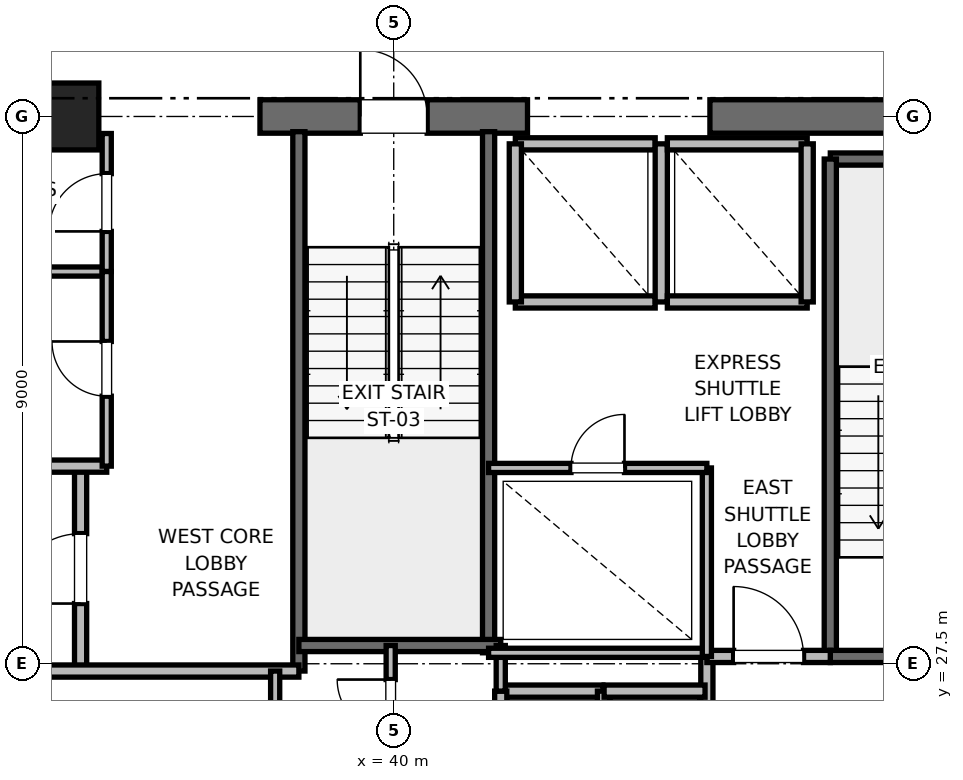
"""IFC4 building model, lengths in metres.
Left out: names, types, materials, properties, quantities, classifications, styles, units other than length and angle.
Written with IfcOpenShell. Run it as: python <this file> out.ifc"""

import sys

from ifc_helpers import new_model, si_unit, direction, frame, frame_2d, origin, origin_2d, place, context, subcontext, project, spatial, rectangle, extrude, element, fill, save


model = new_model("IFC4")
c1 = context("Model", 3, precision=1e-05, world=origin(), true_north=direction((0.0, 1.0)))
c2 = subcontext(c1, "Body", "Model", "MODEL_VIEW")
j1 = project(units=[si_unit("LENGTHUNIT", "METRE"), si_unit("PLANEANGLEUNIT", "RADIAN")], contexts=[c1])
p1 = place(None, origin())
s1 = spatial("IfcSite", under=j1, at=p1, CompositionType="ELEMENT")
p2 = place(p1, origin())
s2 = spatial("IfcBuilding", under=s1, at=p2, CompositionType="ELEMENT")
p3 = place(p2, frame((0.0, 0.0, 164.4)))
s3 = spatial("IfcBuildingStorey", under=s2, at=p3, CompositionType="ELEMENT", Elevation=164.4)
p4 = place(p3, frame((34.6, 36.5, 0.0), z_axis=(0.0, 0.0, 1.0), x_axis=(1.0, 0.0, 0.0)))
e1 = element("IfcColumn", 1, at=p4, inside=s3, PredefinedType="PILASTER", context=c2, shape_type="SweptSolid", body=[
    extrude(rectangle(XDim=1.1, YDim=1.1, at=origin_2d()), origin(), (0.0, 0.0, 1.0), 4.0),
])
p5 = place(p3, frame((29.0, 36.5, 0.0), z_axis=(0.0, 0.0, 1.0), x_axis=(1.0, 0.0, 0.0)))
e2 = element("IfcWall", 2, at=p5, inside=s3, PredefinedType="SHEAR", context=c2, shape_type="SweptSolid", body=[
    extrude(rectangle(XDim=5.8, YDim=0.55, at=frame_2d((2.9, 0.0))), origin(), (0.0, 0.0, 1.0), 3.775),
])
p6 = place(p3, frame((37.8, 36.5, 0.0), z_axis=(0.0, 0.0, 1.0), x_axis=(1.0, 0.0, 0.0)))
e3 = element("IfcWall", 3, at=p6, inside=s3, PredefinedType="SHEAR", context=c2, shape_type="SweptSolid", body=[
    extrude(rectangle(XDim=4.4, YDim=0.55, at=frame_2d((2.2, 0.0))), origin(), (0.0, 0.0, 1.0), 3.775),
])
p7 = place(p6, frame((1.65, 0.0, 0.0)))
e4 = element("IfcOpeningElement", 4, at=p7, cuts=e3, PredefinedType="OPENING", context=c2, shape_type="SweptSolid", body=[
    extrude(rectangle(XDim=1.1, YDim=2.15, at=frame_2d((0.55, 1.075))), frame((0.0, 0.275, 0.0), z_axis=(0.0, -1.0, 0.0), x_axis=(1.0, 0.0, 0.0)), (0.0, 0.0, 1.0), 0.55),
])
p8 = place(p3, frame((45.2, 36.5, 0.0), z_axis=(0.0, 0.0, 1.0), x_axis=(1.0, 0.0, 0.0)))
e5 = element("IfcWall", 5, at=p8, inside=s3, PredefinedType="SHEAR", context=c2, shape_type="SweptSolid", body=[
    extrude(rectangle(XDim=5.8, YDim=0.55, at=frame_2d((2.9, 0.0))), origin(), (0.0, 0.0, 1.0), 3.775),
])
p9 = place(p3, frame((47.18, 35.8, 0.0), z_axis=(0.0, 0.0, 1.0), x_axis=(1.0, 0.0, 0.0)))
e6 = element("IfcWall", 6, at=p9, inside=s3, PredefinedType="SOLIDWALL", context=c2, shape_type="SweptSolid", body=[
    extrude(rectangle(XDim=3.12, YDim=0.2, at=frame_2d((1.56, 0.0))), origin(), (0.0, 0.0, 1.0), 3.775),
])
p10 = place(p3, frame((47.18, 27.62, 0.0), z_axis=(0.0, 0.0, 1.0), x_axis=(0.0, 1.0, 0.0)))
e7 = element("IfcWall", 7, at=p10, inside=s3, PredefinedType="SOLIDWALL", context=c2, shape_type="SweptSolid", body=[
    extrude(rectangle(XDim=8.18, YDim=0.2, at=frame_2d((4.09, 0.0))), origin(), (0.0, 0.0, 1.0), 3.775),
])
p11 = place(p3, frame((47.18, 27.62, 0.0), z_axis=(0.0, 0.0, 1.0), x_axis=(1.0, 0.0, 0.0)))
e8 = element("IfcWall", 8, at=p11, inside=s3, PredefinedType="SOLIDWALL", context=c2, shape_type="SweptSolid", body=[
    extrude(rectangle(XDim=3.12, YDim=0.2, at=frame_2d((1.56, 0.0))), origin(), (0.0, 0.0, 1.0), 3.775),
])
p12 = place(p11, frame((1.01, 0.0, 0.0)))
e9 = element("IfcOpeningElement", 9, at=p12, cuts=e8, PredefinedType="OPENING", context=c2, shape_type="SweptSolid", body=[
    extrude(rectangle(XDim=1.1, YDim=2.15, at=frame_2d((0.55, 1.075))), frame((0.0, 0.1, 0.0), z_axis=(0.0, -1.0, 0.0), x_axis=(1.0, 0.0, 0.0)), (0.0, 0.0, 1.0), 0.2),
])
p13 = place(p3, frame((38.44, 27.38, 0.0), z_axis=(0.0, 0.0, 1.0), x_axis=(0.0, 1.0, 0.0)))
e10 = element("IfcWall", 10, at=p13, inside=s3, PredefinedType="SOLIDWALL", context=c2, shape_type="SweptSolid", body=[
    extrude(rectangle(XDim=8.87, YDim=0.2, at=frame_2d((4.435, 0.0))), origin(), (0.0, 0.0, 1.0), 3.775),
])
p14 = place(p3, frame((41.56, 27.68, 0.0), z_axis=(0.0, 0.0, 1.0), x_axis=(0.0, 1.0, 0.0)))
e11 = element("IfcWall", 11, at=p14, inside=s3, PredefinedType="SOLIDWALL", context=c2, shape_type="SweptSolid", body=[
    extrude(rectangle(XDim=8.57, YDim=0.2, at=frame_2d((4.285, 0.0))), origin(), (0.0, 0.0, 1.0), 3.775),
])
p15 = place(p3, frame((38.44, 27.8, 0.0), z_axis=(0.0, 0.0, 1.0), x_axis=(1.0, 0.0, 0.0)))
e12 = element("IfcWall", 12, at=p15, inside=s3, PredefinedType="SOLIDWALL", context=c2, shape_type="SweptSolid", body=[
    extrude(rectangle(XDim=3.32, YDim=0.2, at=frame_2d((1.66, 0.0))), origin(), (0.0, 0.0, 1.0), 3.775),
])
p16 = place(p3, frame((34.85, 27.38, 0.0), z_axis=(0.0, 0.0, 1.0), x_axis=(0.0, 1.0, 0.0)))
e13 = element("IfcWall", 13, at=p16, inside=s3, PredefinedType="PARTITIONING", context=c2, shape_type="SweptSolid", body=[
    extrude(rectangle(XDim=3.37, YDim=0.2, at=frame_2d((1.685, 0.0))), origin(), (0.0, 0.0, 1.0), 3.775),
])
p17 = place(p16, frame((1.11, 0.0, 0.0)))
e14 = element("IfcOpeningElement", 14, at=p17, cuts=e13, PredefinedType="OPENING", context=c2, shape_type="SweptSolid", body=[
    extrude(rectangle(XDim=1.15, YDim=2.2, at=frame_2d((0.575, 1.1))), frame((0.0, 0.1, 0.0), z_axis=(0.0, -1.0, 0.0), x_axis=(1.0, 0.0, 0.0)), (0.0, 0.0, 1.0), 0.2),
])
p18 = place(p3, frame((32.82, 27.38, 0.0), z_axis=(0.0, 0.0, 1.0), x_axis=(1.0, 0.0, 0.0)))
e15 = element("IfcWall", 15, at=p18, inside=s3, PredefinedType="PARTITIONING", context=c2, shape_type="SweptSolid", body=[
    extrude(rectangle(XDim=5.62, YDim=0.2, at=frame_2d((2.81, 0.0))), origin(), (0.0, 0.0, 1.0), 3.775),
])
p19 = place(p3, frame((32.15, 30.75, 0.0), z_axis=(0.0, 0.0, 1.0), x_axis=(1.0, 0.0, 0.0)))
e16 = element("IfcWall", 16, at=p19, inside=s3, PredefinedType="PARTITIONING", context=c2, shape_type="SweptSolid", body=[
    extrude(rectangle(XDim=3.13, YDim=0.2, at=frame_2d((1.565, 0.0))), origin(), (0.0, 0.0, 1.0), 3.775),
])
p20 = place(p3, frame((45.15, 24.25, 0.0), z_axis=(0.0, 0.0, 1.0), x_axis=(0.0, 1.0, 0.0)))
e17 = element("IfcWall", 17, at=p20, inside=s3, PredefinedType="PARTITIONING", context=c2, shape_type="SweptSolid", body=[
    extrude(rectangle(XDim=3.37, YDim=0.2, at=frame_2d((1.685, 0.0))), origin(), (0.0, 0.0, 1.0), 3.775),
])
p21 = place(p3, frame((45.15, 27.62, 0.0), z_axis=(0.0, 0.0, 1.0), x_axis=(1.0, 0.0, 0.0)))
e18 = element("IfcWall", 18, at=p21, inside=s3, PredefinedType="PARTITIONING", context=c2, shape_type="SweptSolid", body=[
    extrude(rectangle(XDim=2.03, YDim=0.2, at=frame_2d((1.015, 0.0))), origin(), (0.0, 0.0, 1.0), 3.775),
])
p22 = place(p21, frame((0.44, 0.0, 0.0)))
e19 = element("IfcOpeningElement", 19, at=p22, cuts=e18, PredefinedType="OPENING", context=c2, shape_type="SweptSolid", body=[
    extrude(rectangle(XDim=1.15, YDim=2.2, at=frame_2d((0.575, 1.1))), frame((0.0, 0.1, 0.0), z_axis=(0.0, -1.0, 0.0), x_axis=(1.0, 0.0, 0.0)), (0.0, 0.0, 1.0), 0.2),
])
p23 = place(p3, frame((43.44, 27.05, 0.0), z_axis=(0.0, 0.0, 1.0), x_axis=(-1.0, 0.0, 0.0)))
e20 = element("IfcWall", 20, at=p23, inside=s3, PredefinedType="SOLIDWALL", context=c2, shape_type="SweptSolid", body=[
    extrude(rectangle(XDim=1.68, YDim=0.2, at=frame_2d((0.84, 0.0))), origin(), (0.0, 0.0, 1.0), 3.775),
])
for number, where, z_axis, x_axis in (
    (21, (41.76, 27.05, 0.0), (0.0, 0.0, 1.0), (0.0, -1.0, 0.0)),
    (22, (43.45, 24.45, 0.0), (0.0, 0.0, 1.0), (0.0, 1.0, 0.0)),
):
    element("IfcWall", number, at=place(p3, frame(where, z_axis=z_axis, x_axis=x_axis)), inside=s3, PredefinedType="SOLIDWALL", context=c2, shape_type="SweptSolid", body=[
        extrude(rectangle(XDim=2.6, YDim=0.2, at=frame_2d((1.3, 0.0))), origin(), (0.0, 0.0, 1.0), 3.775),
    ])
p24 = place(p3, frame((45.12, 27.05, 0.0), z_axis=(0.0, 0.0, 1.0), x_axis=(-1.0, 0.0, 0.0)))
e23 = element("IfcWall", 23, at=p24, inside=s3, PredefinedType="SOLIDWALL", context=c2, shape_type="SweptSolid", body=[
    extrude(rectangle(XDim=1.66, YDim=0.2, at=frame_2d((0.83, 0.0))), origin(), (0.0, 0.0, 1.0), 3.775),
])
p25 = place(p3, frame((42.0, 33.45, 0.0), z_axis=(0.0, 0.0, 1.0), x_axis=(1.0, 0.0, 0.0)))
e24 = element("IfcWall", 24, at=p25, inside=s3, PredefinedType="SOLIDWALL", context=c2, shape_type="SweptSolid", body=[
    extrude(rectangle(XDim=2.3, YDim=0.2, at=frame_2d((1.15, 0.0))), origin(), (0.0, 0.0, 1.0), 3.775),
])
p26 = place(p3, frame((44.3, 36.05, 0.0), z_axis=(0.0, 0.0, 1.0), x_axis=(-1.0, 0.0, 0.0)))
e25 = element("IfcWall", 25, at=p26, inside=s3, PredefinedType="SOLIDWALL", context=c2, shape_type="SweptSolid", body=[
    extrude(rectangle(XDim=2.3, YDim=0.2, at=frame_2d((1.15, 0.0))), origin(), (0.0, 0.0, 1.0), 2.755),
])
for number, where, z_axis, x_axis in (
    (26, (42.0, 36.05, 0.0), (0.0, 0.0, 1.0), (0.0, -1.0, 0.0)),
    (27, (44.4, 33.45, 0.0), (0.0, 0.0, 1.0), (0.0, 1.0, 0.0)),
):
    element("IfcWall", number, at=place(p3, frame(where, z_axis=z_axis, x_axis=x_axis)), inside=s3, PredefinedType="SOLIDWALL", context=c2, shape_type="SweptSolid", body=[
        extrude(rectangle(XDim=2.6, YDim=0.2, at=frame_2d((1.3, 0.0))), origin(), (0.0, 0.0, 1.0), 2.755),
    ])
p27 = place(p3, frame((44.5, 33.45, 0.0), z_axis=(0.0, 0.0, 1.0), x_axis=(1.0, 0.0, 0.0)))
e28 = element("IfcWall", 28, at=p27, inside=s3, PredefinedType="SOLIDWALL", context=c2, shape_type="SweptSolid", body=[
    extrude(rectangle(XDim=2.3, YDim=0.2, at=frame_2d((1.15, 0.0))), origin(), (0.0, 0.0, 1.0), 3.775),
])
p28 = place(p3, frame((46.8, 36.05, 0.0), z_axis=(0.0, 0.0, 1.0), x_axis=(-1.0, 0.0, 0.0)))
e29 = element("IfcWall", 29, at=p28, inside=s3, PredefinedType="SOLIDWALL", context=c2, shape_type="SweptSolid", body=[
    extrude(rectangle(XDim=2.3, YDim=0.2, at=frame_2d((1.15, 0.0))), origin(), (0.0, 0.0, 1.0), 2.755),
])
p29 = place(p3, frame((46.8, 33.45, 0.0), z_axis=(0.0, 0.0, 1.0), x_axis=(0.0, 1.0, 0.0)))
e30 = element("IfcWall", 30, at=p29, inside=s3, PredefinedType="SOLIDWALL", context=c2, shape_type="SweptSolid", body=[
    extrude(rectangle(XDim=2.6, YDim=0.2, at=frame_2d((1.3, 0.0))), origin(), (0.0, 0.0, 1.0), 3.775),
])
p30 = place(p3, frame((41.76, 27.05, 0.0), z_axis=(0.0, 0.0, 1.0), x_axis=(0.0, 1.0, 0.0)))
e31 = element("IfcWall", 31, at=p30, inside=s3, PredefinedType="PARTITIONING", context=c2, shape_type="SweptSolid", body=[
    extrude(rectangle(XDim=0.75, YDim=0.15, at=frame_2d((0.375, 0.0))), origin(), (0.0, 0.0, 1.0), 2.85),
])
p31 = place(p3, frame((39.95, 25.8, 0.0), z_axis=(0.0, 0.0, 1.0), x_axis=(0.0, 1.0, 0.0)))
e32 = element("IfcWall", 32, at=p31, inside=s3, PredefinedType="PARTITIONING", context=c2, shape_type="SweptSolid", body=[
    extrude(rectangle(XDim=2.0, YDim=0.15, at=frame_2d((1.0, 0.0))), origin(), (0.0, 0.0, 1.0), 2.85),
])
p32 = place(p31, frame((0.56, 0.0, 0.0)))
e33 = element("IfcOpeningElement", 33, at=p32, cuts=e32, PredefinedType="OPENING", context=c2, shape_type="SweptSolid", body=[
    extrude(rectangle(XDim=0.88, YDim=2.1, at=frame_2d((0.44, 1.05))), frame((0.0, 0.075, 0.0), z_axis=(0.0, -1.0, 0.0), x_axis=(1.0, 0.0, 0.0)), (0.0, 0.0, 1.0), 0.15),
])
p33 = place(p3, frame((32.15, 33.95, 0.0), z_axis=(0.0, 0.0, 1.0), x_axis=(1.0, 0.0, 0.0)))
e34 = element("IfcWall", 34, at=p33, inside=s3, PredefinedType="PARTITIONING", context=c2, shape_type="SweptSolid", body=[
    extrude(rectangle(XDim=3.13, YDim=0.15, at=frame_2d((1.565, 0.0))), origin(), (0.0, 0.0, 1.0), 2.85),
])
p34 = place(p3, frame((35.28, 33.95, 0.0), z_axis=(0.0, 0.0, 1.0), x_axis=(0.0, 1.0, 0.0)))
e35 = element("IfcWall", 35, at=p34, inside=s3, PredefinedType="PARTITIONING", context=c2, shape_type="SweptSolid", body=[
    extrude(rectangle(XDim=2.27, YDim=0.15, at=frame_2d((1.135, 0.0))), origin(), (0.0, 0.0, 1.0), 2.755),
])
p35 = place(p34, frame((0.66, 0.0, 0.0)))
e36 = element("IfcOpeningElement", 36, at=p35, cuts=e35, PredefinedType="OPENING", context=c2, shape_type="SweptSolid", body=[
    extrude(rectangle(XDim=0.95, YDim=2.15, at=frame_2d((0.475, 1.075))), frame((0.0, 0.075, 0.0), z_axis=(0.0, -1.0, 0.0), x_axis=(1.0, 0.0, 0.0)), (0.0, 0.0, 1.0), 0.15),
])
p36 = place(p3, frame((35.28, 30.75, 0.0), z_axis=(0.0, 0.0, 1.0), x_axis=(0.0, 1.0, 0.0)))
e37 = element("IfcWall", 37, at=p36, inside=s3, PredefinedType="PARTITIONING", context=c2, shape_type="SweptSolid", body=[
    extrude(rectangle(XDim=3.2, YDim=0.15, at=frame_2d((1.6, 0.0))), origin(), (0.0, 0.0, 1.0), 2.85),
])
p37 = place(p36, frame((1.15, 0.0, 0.0)))
e38 = element("IfcOpeningElement", 38, at=p37, cuts=e37, PredefinedType="OPENING", context=c2, shape_type="SweptSolid", body=[
    extrude(rectangle(XDim=0.9, YDim=2.1, at=frame_2d((0.45, 1.05))), frame((0.0, 0.075, 0.0), z_axis=(0.0, -1.0, 0.0), x_axis=(1.0, 0.0, 0.0)), (0.0, 0.0, 1.0), 0.15),
])
p38 = place(p3, frame((38.05, 18.6, 0.0), z_axis=(0.0, 0.0, 1.0), x_axis=(0.0, 1.0, 0.0)))
e39 = element("IfcWall", 39, at=p38, inside=s3, PredefinedType="PARTITIONING", context=c2, shape_type="SweptSolid", body=[
    extrude(rectangle(XDim=8.78, YDim=0.15, at=frame_2d((4.39, 0.0))), origin(), (0.0, 0.0, 1.0), 2.755),
])
p39 = place(p38, frame((3.89, 0.0, 0.0)))
e40 = element("IfcOpeningElement", 40, at=p39, cuts=e39, PredefinedType="OPENING", context=c2, shape_type="SweptSolid", body=[
    extrude(rectangle(XDim=1.0, YDim=2.15, at=frame_2d((0.5, 1.075))), frame((0.0, 0.075, 0.0), z_axis=(0.0, -1.0, 0.0), x_axis=(1.0, 0.0, 0.0)), (0.0, 0.0, 1.0), 0.15),
])
p40 = place(p3, frame((41.56, 27.68, 0.0), z_axis=(0.0, 0.0, 1.0), x_axis=(1.0, 0.0, 0.0)))
e41 = element("IfcWall", 41, at=p40, inside=s3, PredefinedType="PARTITIONING", context=c2, shape_type="SweptSolid", body=[
    extrude(rectangle(XDim=3.59, YDim=0.15, at=frame_2d((1.795, 0.0))), origin(), (0.0, 0.0, 1.0), 2.85),
])
p41 = place(p3, frame((45.15, 27.62, 0.0), z_axis=(0.0, 0.0, 1.0), x_axis=(0.0, 1.0, 0.0)))
e42 = element("IfcWall", 42, at=p41, inside=s3, PredefinedType="PARTITIONING", context=c2, shape_type="SweptSolid", body=[
    extrude(rectangle(XDim=3.1, YDim=0.15, at=frame_2d((1.55, 0.0))), origin(), (0.0, 0.0, 1.0), 2.85),
])
p42 = place(p3, frame((41.56, 30.72, 0.0), z_axis=(0.0, 0.0, 1.0), x_axis=(1.0, 0.0, 0.0)))
e43 = element("IfcWall", 43, at=p42, inside=s3, PredefinedType="PARTITIONING", context=c2, shape_type="SweptSolid", body=[
    extrude(rectangle(XDim=3.59, YDim=0.15, at=frame_2d((1.795, 0.0))), origin(), (0.0, 0.0, 1.0), 2.85),
])
p43 = place(p42, frame((1.355, 0.0, 0.0)))
e44 = element("IfcOpeningElement", 44, at=p43, cuts=e43, PredefinedType="OPENING", context=c2, shape_type="SweptSolid", body=[
    extrude(rectangle(XDim=0.88, YDim=2.1, at=frame_2d((0.44, 1.05))), frame((0.0, 0.075, 0.0), z_axis=(0.0, -1.0, 0.0), x_axis=(1.0, 0.0, 0.0)), (0.0, 0.0, 1.0), 0.15),
])
p44 = place(p7, origin())
e45 = element("IfcDoor", 45, at=p44, inside=s3, OperationType="SINGLE_SWING_LEFT", PredefinedType="DOOR", context=c2, shape_type="SweptSolid", body=[
    extrude(rectangle(XDim=1.1, YDim=2.15, at=frame_2d((0.55, 1.075))), frame((0.0, 0.025, 0.0), z_axis=(0.0, -1.0, 0.0), x_axis=(1.0, 0.0, 0.0)), (0.0, 0.0, 1.0), 0.05),
])
fill(e4, e45)
p45 = place(p17, origin())
e46 = element("IfcDoor", 46, at=p45, inside=s3, OperationType="SINGLE_SWING_LEFT", PredefinedType="DOOR", context=c2, shape_type="SweptSolid", body=[
    extrude(rectangle(XDim=1.15, YDim=2.2, at=frame_2d((0.575, 1.1))), frame((0.0, 0.025, 0.0), z_axis=(0.0, -1.0, 0.0), x_axis=(1.0, 0.0, 0.0)), (0.0, 0.0, 1.0), 0.05),
])
fill(e14, e46)
p46 = place(p22, origin())
e47 = element("IfcDoor", 47, at=p46, inside=s3, OperationType="SINGLE_SWING_LEFT", PredefinedType="DOOR", context=c2, shape_type="SweptSolid", body=[
    extrude(rectangle(XDim=1.15, YDim=2.2, at=frame_2d((0.575, 1.1))), frame((0.0, 0.025, 0.0), z_axis=(0.0, -1.0, 0.0), x_axis=(1.0, 0.0, 0.0)), (0.0, 0.0, 1.0), 0.05),
])
fill(e19, e47)
p47 = place(p32, origin())
e48 = element("IfcDoor", 48, at=p47, inside=s3, OperationType="SINGLE_SWING_RIGHT", PredefinedType="DOOR", context=c2, shape_type="SweptSolid", body=[
    extrude(rectangle(XDim=0.88, YDim=2.1, at=frame_2d((0.44, 1.05))), frame((0.0, 0.025, 0.0), z_axis=(0.0, -1.0, 0.0), x_axis=(1.0, 0.0, 0.0)), (0.0, 0.0, 1.0), 0.05),
])
fill(e33, e48)
p48 = place(p35, origin())
e49 = element("IfcDoor", 49, at=p48, inside=s3, OperationType="SINGLE_SWING_LEFT", PredefinedType="DOOR", context=c2, shape_type="SweptSolid", body=[
    extrude(rectangle(XDim=0.95, YDim=2.15, at=frame_2d((0.475, 1.075))), frame((0.0, 0.025, 0.0), z_axis=(0.0, -1.0, 0.0), x_axis=(1.0, 0.0, 0.0)), (0.0, 0.0, 1.0), 0.05),
])
fill(e36, e49)
p49 = place(p37, origin())
e50 = element("IfcDoor", 50, at=p49, inside=s3, OperationType="SINGLE_SWING_RIGHT", PredefinedType="DOOR", context=c2, shape_type="SweptSolid", body=[
    extrude(rectangle(XDim=0.9, YDim=2.1, at=frame_2d((0.45, 1.05))), frame((0.0, 0.025, 0.0), z_axis=(0.0, -1.0, 0.0), x_axis=(1.0, 0.0, 0.0)), (0.0, 0.0, 1.0), 0.05),
])
fill(e38, e50)
p50 = place(p43, origin())
e51 = element("IfcDoor", 51, at=p50, inside=s3, OperationType="SINGLE_SWING_RIGHT", PredefinedType="DOOR", context=c2, shape_type="SweptSolid", body=[
    extrude(rectangle(XDim=0.88, YDim=2.1, at=frame_2d((0.44, 1.05))), frame((0.0, 0.025, 0.0), z_axis=(0.0, -1.0, 0.0), x_axis=(1.0, 0.0, 0.0)), (0.0, 0.0, 1.0), 0.05),
])
fill(e44, e51)
save(model, sys.argv[1])
